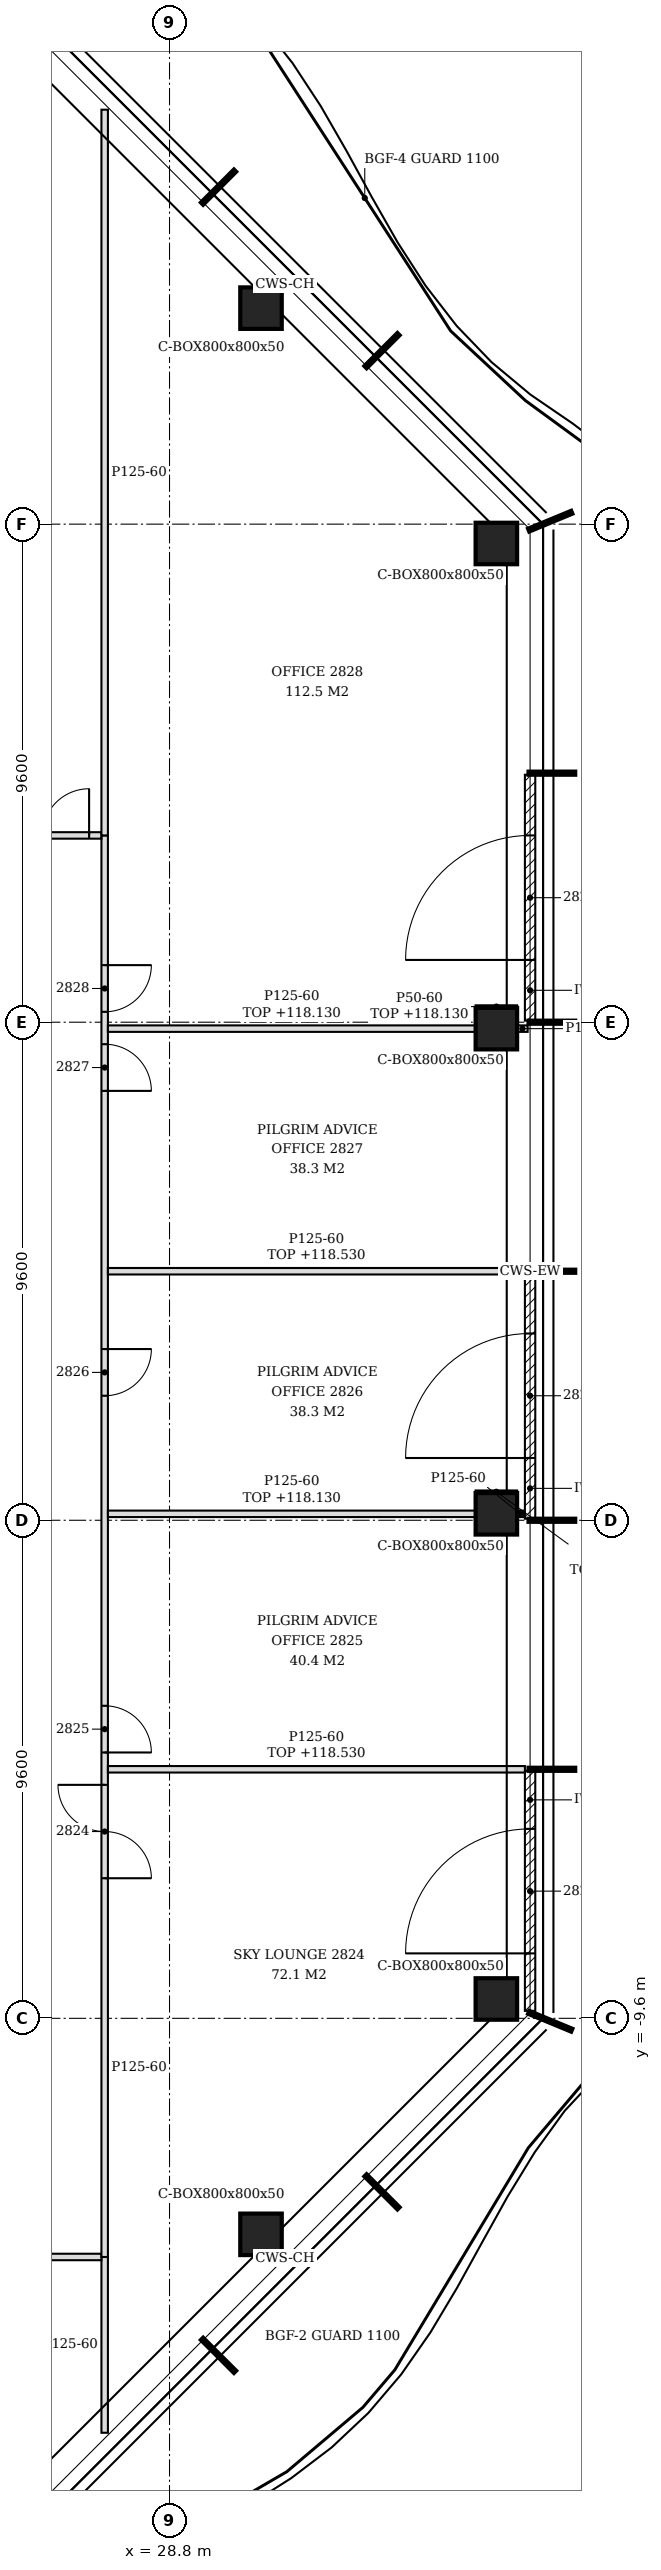
"""IFC4 building model, lengths in metres.
Left out: names, types, materials, properties, quantities, classifications, styles, units other than length and angle.
Written with IfcOpenShell. Run it as: python <this file> out.ifc"""

import sys

from ifc_helpers import new_model, si_unit, direction, frame, frame_2d, origin, origin_2d, place, context, subcontext, project, spatial, polyline, rectangle, hollow_rectangle, outline, extrude, clip, halfspace, element, fill, save


model = new_model("IFC4")
c1 = context("Model", 3, precision=1e-05, world=origin(), true_north=direction((0.0, 1.0)))
c2 = subcontext(c1, "Body", "Model", "MODEL_VIEW")
j1 = project(units=[si_unit("LENGTHUNIT", "METRE"), si_unit("PLANEANGLEUNIT", "RADIAN")], contexts=[c1])
p1 = place(None, origin())
s1 = spatial("IfcSite", under=j1, at=p1, CompositionType="ELEMENT")
p2 = place(p1, origin())
s2 = spatial("IfcBuilding", under=s1, at=p2, CompositionType="ELEMENT")
p3 = place(p2, frame((0.0, 0.0, 115.8)))
s3 = spatial("IfcBuildingStorey", under=s2, at=p3, CompositionType="ELEMENT", Elevation=115.8)
for number, where, z_axis, x_axis in (
    (1, (30.564, -13.764, -0.15), (0.0, 0.0, 1.0), (1.0, 0.0, 0.0)),
    (2, (35.1, -9.227, -0.15), (0.0, 0.0, 1.0), (1.0, 0.0, 0.0)),
    (3, (35.1, 0.124, -0.15), (0.0, 0.0, 1.0), (1.0, 0.0, 0.0)),
    (4, (35.1, 9.476, -0.15), (0.0, 0.0, 1.0), (1.0, 0.0, 0.0)),
    (5, (35.1, 18.827, -0.15), (0.0, 0.0, 1.0), (1.0, 0.0, 0.0)),
    (6, (30.564, 23.364, -0.15), (0.0, 0.0, 1.0), (1.0, 0.0, 0.0)),
):
    element("IfcColumn", number, at=place(p3, frame(where, z_axis=z_axis, x_axis=x_axis)), inside=s3, PredefinedType="COLUMN", context=c2, shape_type="Clipping", body=[
        clip(clip(extrude(hollow_rectangle(XDim=0.8, YDim=0.8, WallThickness=0.05, at=origin_2d()), origin(), (0.0, 0.0, 1.0), 3.5), halfspace(frame((0.0, 0.0, 0.021), z_axis=(0.0, 0.0, 1.0), x_axis=(1.0, 0.0, 0.0)), True)), halfspace(frame((0.0, 0.0, 3.05), z_axis=(0.0, 0.0, 1.0), x_axis=(1.0, 0.0, 0.0)), False)),
    ])
p4 = place(p3, frame((35.75, -9.457, 0.0), z_axis=(0.0, 0.0, 1.0), x_axis=(0.0, 1.0, 0.0)))
e7 = element("IfcWall", 7, at=p4, inside=s3, PredefinedType="NOTDEFINED", context=c2, shape_type="SweptSolid", body=[
    extrude(rectangle(XDim=4.626, YDim=0.2, at=frame_2d((2.313, 0.0))), origin(), (0.0, 0.0, 1.0), 3.35),
])
p5 = place(p4, frame((1.108, 0.0, 0.0)))
e8 = element("IfcOpeningElement", 8, at=p5, cuts=e7, PredefinedType="OPENING", context=c2, shape_type="SweptSolid", body=[
    extrude(rectangle(XDim=2.4, YDim=2.4, at=frame_2d((1.2, 1.2))), frame((0.0, 0.11, 0.0), z_axis=(0.0, -1.0, 0.0), x_axis=(1.0, 0.0, 0.0)), (0.0, 0.0, 1.0), 0.22),
])
p6 = place(p3, frame((35.75, 0.03, 0.0), z_axis=(0.0, 0.0, 1.0), x_axis=(0.0, 1.0, 0.0)))
e9 = element("IfcWall", 9, at=p6, inside=s3, PredefinedType="NOTDEFINED", context=c2, shape_type="SweptSolid", body=[
    extrude(rectangle(XDim=4.74, YDim=0.2, at=frame_2d((2.37, 0.0))), origin(), (0.0, 0.0, 1.0), 3.35),
])
p7 = place(p6, frame((1.17, 0.0, 0.0)))
e10 = element("IfcOpeningElement", 10, at=p7, cuts=e9, PredefinedType="OPENING", context=c2, shape_type="SweptSolid", body=[
    extrude(rectangle(XDim=2.4, YDim=2.4, at=frame_2d((1.2, 1.2))), frame((0.0, 0.11, 0.0), z_axis=(0.0, -1.0, 0.0), x_axis=(1.0, 0.0, 0.0)), (0.0, 0.0, 1.0), 0.22),
])
p8 = place(p3, frame((35.75, 9.63, 0.0), z_axis=(0.0, 0.0, 1.0), x_axis=(0.0, 1.0, 0.0)))
e11 = element("IfcWall", 11, at=p8, inside=s3, PredefinedType="NOTDEFINED", context=c2, shape_type="SweptSolid", body=[
    extrude(rectangle(XDim=4.74, YDim=0.2, at=frame_2d((2.37, 0.0))), origin(), (0.0, 0.0, 1.0), 3.35),
])
p9 = place(p8, frame((1.17, 0.0, 0.0)))
e12 = element("IfcOpeningElement", 12, at=p9, cuts=e11, PredefinedType="OPENING", context=c2, shape_type="SweptSolid", body=[
    extrude(rectangle(XDim=2.4, YDim=2.4, at=frame_2d((1.2, 1.2))), frame((0.0, 0.11, 0.0), z_axis=(0.0, -1.0, 0.0), x_axis=(1.0, 0.0, 0.0)), (0.0, 0.0, 1.0), 0.22),
])
p10 = place(p3, frame((27.55, -17.589, 0.0), z_axis=(0.0, 0.0, 1.0), x_axis=(0.0, 1.0, 0.0)))
e13 = element("IfcWall", 13, at=p10, inside=s3, PredefinedType="PARTITIONING", context=c2, shape_type="SweptSolid", body=[
    extrude(outline(polyline([(0.0, 0.0), (3.389, 0.0), (3.389, 3.35), (3.289, 3.35), (3.287, 2.83), (3.089, 2.83), (3.087, 3.35), (1.581, 3.35), (1.579, 2.33), (0.042, 2.33), (0.04, 3.35), (0.0, 3.35), (0.0, 0.0)])), frame((0.0, 0.062, 0.0), z_axis=(0.0, -1.0, 0.0), x_axis=(1.0, 0.0, 0.0)), (0.0, 0.0, 1.0), 0.125),
])
p11 = place(p3, frame((-14.4, -14.2, 0.0), z_axis=(0.0, 0.0, 1.0), x_axis=(1.0, 0.0, 0.0)))
e14 = element("IfcWall", 14, at=p11, inside=s3, PredefinedType="PARTITIONING", context=c2, shape_type="SweptSolid", body=[
    extrude(outline(polyline([(0.0, 0.0), (41.887, 0.0), (41.887, 3.35), (33.751, 3.35), (33.749, 2.322), (33.449, 2.322), (33.447, 3.35), (21.75, 3.35), (21.748, 2.83), (21.45, 2.83), (21.448, 3.35), (9.75, 3.35), (9.748, 2.83), (9.45, 2.83), (9.448, 3.35), (0.15, 3.35), (0.148, 2.93), (0.0, 2.93), (0.0, 0.0)])), frame((0.0, 0.062, 0.0), z_axis=(0.0, -1.0, 0.0), x_axis=(1.0, 0.0, 0.0)), (0.0, 0.0, 1.0), 0.125),
])
p12 = place(p11, frame((1.3, 0.0, 0.0)))
e15 = element("IfcOpeningElement", 15, at=p12, cuts=e14, PredefinedType="OPENING", context=c2, shape_type="SweptSolid", body=[
    extrude(rectangle(XDim=0.8, YDim=2.1, at=frame_2d((0.4, 1.05))), frame((0.0, 0.073, 0.0), z_axis=(0.0, -1.0, 0.0), x_axis=(1.0, 0.0, 0.0)), (0.0, 0.0, 1.0), 0.145),
])
p13 = place(p11, frame((6.0, 0.0, 0.0)))
e16 = element("IfcOpeningElement", 16, at=p13, cuts=e14, PredefinedType="OPENING", context=c2, shape_type="SweptSolid", body=[
    extrude(rectangle(XDim=0.9, YDim=2.1, at=frame_2d((0.45, 1.05))), frame((0.0, 0.073, 0.0), z_axis=(0.0, -1.0, 0.0), x_axis=(1.0, 0.0, 0.0)), (0.0, 0.0, 1.0), 0.145),
])
p14 = place(p11, frame((10.986, 0.0, 0.0)))
e17 = element("IfcOpeningElement", 17, at=p14, cuts=e14, PredefinedType="OPENING", context=c2, shape_type="SweptSolid", body=[
    extrude(rectangle(XDim=0.9, YDim=2.1, at=frame_2d((0.45, 1.05))), frame((0.0, 0.073, 0.0), z_axis=(0.0, -1.0, 0.0), x_axis=(1.0, 0.0, 0.0)), (0.0, 0.0, 1.0), 0.145),
])
p15 = place(p11, frame((15.6, 0.0, 0.0)))
e18 = element("IfcOpeningElement", 18, at=p15, cuts=e14, PredefinedType="OPENING", context=c2, shape_type="SweptSolid", body=[
    extrude(rectangle(XDim=0.9, YDim=2.1, at=frame_2d((0.45, 1.05))), frame((0.0, 0.073, 0.0), z_axis=(0.0, -1.0, 0.0), x_axis=(1.0, 0.0, 0.0)), (0.0, 0.0, 1.0), 0.145),
])
p16 = place(p11, frame((20.4, 0.0, 0.0)))
e19 = element("IfcOpeningElement", 19, at=p16, cuts=e14, PredefinedType="OPENING", context=c2, shape_type="SweptSolid", body=[
    extrude(rectangle(XDim=0.9, YDim=2.1, at=frame_2d((0.45, 1.05))), frame((0.0, 0.073, 0.0), z_axis=(0.0, -1.0, 0.0), x_axis=(1.0, 0.0, 0.0)), (0.0, 0.0, 1.0), 0.145),
])
p17 = place(p11, frame((23.4, 0.0, 0.0)))
e20 = element("IfcOpeningElement", 20, at=p17, cuts=e14, PredefinedType="OPENING", context=c2, shape_type="SweptSolid", body=[
    extrude(rectangle(XDim=0.9, YDim=2.1, at=frame_2d((0.45, 1.05))), frame((0.0, 0.073, 0.0), z_axis=(0.0, -1.0, 0.0), x_axis=(1.0, 0.0, 0.0)), (0.0, 0.0, 1.0), 0.145),
])
p18 = place(p11, frame((26.714, 0.0, 0.0)))
e21 = element("IfcOpeningElement", 21, at=p18, cuts=e14, PredefinedType="OPENING", context=c2, shape_type="SweptSolid", body=[
    extrude(rectangle(XDim=0.9, YDim=2.1, at=frame_2d((0.45, 1.05))), frame((0.0, 0.073, 0.0), z_axis=(0.0, -1.0, 0.0), x_axis=(1.0, 0.0, 0.0)), (0.0, 0.0, 1.0), 0.145),
])
p19 = place(p11, frame((31.6, 0.0, 0.0)))
e22 = element("IfcOpeningElement", 22, at=p19, cuts=e14, PredefinedType="OPENING", context=c2, shape_type="SweptSolid", body=[
    extrude(rectangle(XDim=0.9, YDim=2.1, at=frame_2d((0.45, 1.05))), frame((0.0, 0.073, 0.0), z_axis=(0.0, -1.0, 0.0), x_axis=(1.0, 0.0, 0.0)), (0.0, 0.0, 1.0), 0.145),
])
p20 = place(p11, frame((33.95, 0.0, 0.0)))
e23 = element("IfcOpeningElement", 23, at=p20, cuts=e14, PredefinedType="OPENING", context=c2, shape_type="SweptSolid", body=[
    extrude(rectangle(XDim=0.8, YDim=2.1, at=frame_2d((0.4, 1.05))), frame((0.0, 0.073, 0.0), z_axis=(0.0, -1.0, 0.0), x_axis=(1.0, 0.0, 0.0)), (0.0, 0.0, 1.0), 0.145),
])
p21 = place(p3, frame((27.55, -14.2, 0.0), z_axis=(0.0, 0.0, 1.0), x_axis=(0.0, 1.0, 0.0)))
e24 = element("IfcWall", 24, at=p21, inside=s3, PredefinedType="PARTITIONING", context=c2, shape_type="SweptSolid", body=[
    extrude(outline(polyline([(0.0, 0.0), (27.4, 0.0), (27.4, 3.35), (24.3, 3.35), (24.298, 2.33), (23.3, 2.33), (23.298, 3.35), (19.11, 3.35), (19.108, 2.73), (18.89, 2.73), (18.888, 3.35), (14.7, 3.35), (14.698, 2.33), (13.7, 2.33), (13.698, 3.35), (9.51, 3.35), (9.508, 2.73), (9.29, 2.73), (9.288, 3.35), (4.71, 3.35), (4.708, 2.73), (4.49, 2.73), (4.488, 3.35), (0.0, 3.35), (0.0, 0.0)])), frame((0.0, 0.062, 0.0), z_axis=(0.0, -1.0, 0.0), x_axis=(1.0, 0.0, 0.0)), (0.0, 0.0, 1.0), 0.125),
])
p22 = place(p21, frame((7.3, 0.0, 0.0)))
e25 = element("IfcOpeningElement", 25, at=p22, cuts=e24, PredefinedType="OPENING", context=c2, shape_type="SweptSolid", body=[
    extrude(rectangle(XDim=1.8, YDim=2.1, at=frame_2d((0.9, 1.05))), frame((0.0, 0.073, 0.0), z_axis=(0.0, -1.0, 0.0), x_axis=(1.0, 0.0, 0.0)), (0.0, 0.0, 1.0), 0.145),
])
p23 = place(p21, frame((9.724, 0.0, 0.0)))
e26 = element("IfcOpeningElement", 26, at=p23, cuts=e24, PredefinedType="OPENING", context=c2, shape_type="SweptSolid", body=[
    extrude(rectangle(XDim=0.9, YDim=2.1, at=frame_2d((0.45, 1.05))), frame((0.0, 0.073, 0.0), z_axis=(0.0, -1.0, 0.0), x_axis=(1.0, 0.0, 0.0)), (0.0, 0.0, 1.0), 0.145),
])
p24 = place(p21, frame((16.6, 0.0, 0.0)))
e27 = element("IfcOpeningElement", 27, at=p24, cuts=e24, PredefinedType="OPENING", context=c2, shape_type="SweptSolid", body=[
    extrude(rectangle(XDim=0.9, YDim=2.1, at=frame_2d((0.45, 1.05))), frame((0.0, 0.073, 0.0), z_axis=(0.0, -1.0, 0.0), x_axis=(1.0, 0.0, 0.0)), (0.0, 0.0, 1.0), 0.145),
])
p25 = place(p21, frame((22.476, 0.0, 0.0)))
e28 = element("IfcOpeningElement", 28, at=p25, cuts=e24, PredefinedType="OPENING", context=c2, shape_type="SweptSolid", body=[
    extrude(rectangle(XDim=0.9, YDim=2.1, at=frame_2d((0.45, 1.05))), frame((0.0, 0.073, 0.0), z_axis=(0.0, -1.0, 0.0), x_axis=(1.0, 0.0, 0.0)), (0.0, 0.0, 1.0), 0.145),
])
p26 = place(p21, frame((24.0, 0.0, 0.0)))
e29 = element("IfcOpeningElement", 29, at=p26, cuts=e24, PredefinedType="OPENING", context=c2, shape_type="SweptSolid", body=[
    extrude(rectangle(XDim=0.9, YDim=2.1, at=frame_2d((0.45, 1.05))), frame((0.0, 0.073, 0.0), z_axis=(0.0, -1.0, 0.0), x_axis=(1.0, 0.0, 0.0)), (0.0, 0.0, 1.0), 0.145),
])
p27 = place(p3, frame((27.613, -4.8, 0.0), z_axis=(0.0, 0.0, 1.0), x_axis=(1.0, 0.0, 0.0)))
e30 = element("IfcWall", 30, at=p27, inside=s3, PredefinedType="PARTITIONING", context=c2, shape_type="SweptSolid", body=[
    extrude(outline(polyline([(0.0, 0.0), (8.037, 0.0), (8.038, 2.73), (7.988, 2.73), (7.986, 2.33), (6.988, 2.33), (6.986, 2.73), (0.0, 2.73), (0.0, 0.0)])), frame((0.0, 0.062, 0.0), z_axis=(0.0, -1.0, 0.0), x_axis=(1.0, 0.0, 0.0)), (0.0, 0.0, 1.0), 0.125),
])
p28 = place(p3, frame((27.613, 0.124, 0.0), z_axis=(0.0, 0.0, 1.0), x_axis=(1.0, 0.0, 0.0)))
e31 = element("IfcWall", 31, at=p28, inside=s3, PredefinedType="PARTITIONING", context=c2, shape_type="SweptSolid", body=[
    extrude(rectangle(XDim=7.087, YDim=0.125, at=frame_2d((3.544, 0.0))), origin(), (0.0, 0.0, 1.0), 2.33),
])
p29 = place(p3, frame((35.5, 0.124, 0.0), z_axis=(0.0, 0.0, 1.0), x_axis=(1.0, 0.0, 0.0)))
e32 = element("IfcWall", 32, at=p29, inside=s3, PredefinedType="PARTITIONING", context=c2, shape_type="SweptSolid", body=[
    extrude(outline(polyline([(0.0, 0.0), (0.12, 0.0), (0.12, 3.35), (0.1, 3.35), (0.098, 2.33), (0.0, 2.33), (0.0, 0.0)])), frame((0.0, 0.062, 0.0), z_axis=(0.0, -1.0, 0.0), x_axis=(1.0, 0.0, 0.0)), (0.0, 0.0, 1.0), 0.125),
])
p30 = place(p3, frame((27.613, 4.8, 0.0), z_axis=(0.0, 0.0, 1.0), x_axis=(1.0, 0.0, 0.0)))
e33 = element("IfcWall", 33, at=p30, inside=s3, PredefinedType="PARTITIONING", context=c2, shape_type="SweptSolid", body=[
    extrude(outline(polyline([(0.0, 0.0), (8.037, 0.0), (8.038, 2.73), (7.988, 2.73), (7.986, 2.33), (6.988, 2.33), (6.986, 2.73), (0.0, 2.73), (0.0, 0.0)])), frame((0.0, 0.062, 0.0), z_axis=(0.0, -1.0, 0.0), x_axis=(1.0, 0.0, 0.0)), (0.0, 0.0, 1.0), 0.125),
])
p31 = place(p3, frame((27.613, 9.476, 0.0), z_axis=(0.0, 0.0, 1.0), x_axis=(1.0, 0.0, 0.0)))
e34 = element("IfcWall", 34, at=p31, inside=s3, PredefinedType="PARTITIONING", context=c2, shape_type="SweptSolid", body=[
    extrude(rectangle(XDim=7.087, YDim=0.125, at=frame_2d((3.544, 0.0))), origin(), (0.0, 0.0, 1.0), 2.33),
])
p32 = place(p3, frame((35.5, 9.476, 0.0), z_axis=(0.0, 0.0, 1.0), x_axis=(1.0, 0.0, 0.0)))
e35 = element("IfcWall", 35, at=p32, inside=s3, PredefinedType="PARTITIONING", context=c2, shape_type="SweptSolid", body=[
    extrude(outline(polyline([(0.0, 0.0), (0.203, 0.0), (0.203, 3.35), (0.1, 3.35), (0.098, 2.33), (0.0, 2.33), (0.0, 0.0)])), frame((0.0, 0.062, 0.0), z_axis=(0.0, -1.0, 0.0), x_axis=(1.0, 0.0, 0.0)), (0.0, 0.0, 1.0), 0.125),
])
p33 = place(p3, frame((25.15, 13.2, 0.0), z_axis=(0.0, 0.0, 1.0), x_axis=(1.0, 0.0, 0.0)))
e36 = element("IfcWall", 36, at=p33, inside=s3, PredefinedType="PARTITIONING", context=c2, shape_type="SweptSolid", body=[
    extrude(rectangle(XDim=2.338, YDim=0.125, at=frame_2d((1.169, 0.0))), origin(), (0.0, 0.0, 1.0), 3.35),
])
p34 = place(p33, frame((0.3, 0.0, 0.0)))
e37 = element("IfcOpeningElement", 37, at=p34, cuts=e36, PredefinedType="OPENING", context=c2, shape_type="SweptSolid", body=[
    extrude(rectangle(XDim=1.8, YDim=2.1, at=frame_2d((0.9, 1.05))), frame((0.0, 0.073, 0.0), z_axis=(0.0, -1.0, 0.0), x_axis=(1.0, 0.0, 0.0)), (0.0, 0.0, 1.0), 0.145),
])
p35 = place(p3, frame((27.55, 13.2, 0.0), z_axis=(0.0, 0.0, 1.0), x_axis=(0.0, 1.0, 0.0)))
e38 = element("IfcWall", 38, at=p35, inside=s3, PredefinedType="PARTITIONING", context=c2, shape_type="SweptSolid", body=[
    extrude(outline(polyline([(0.0, 0.0), (13.989, 0.0), (13.989, 3.35), (13.947, 3.35), (13.945, 2.33), (12.408, 2.33), (12.406, 3.35), (10.9, 3.35), (10.898, 2.83), (10.7, 2.83), (10.698, 3.35), (6.11, 3.35), (6.108, 2.73), (5.89, 2.73), (5.888, 3.35), (1.31, 3.35), (1.308, 2.73), (1.09, 2.73), (1.088, 3.35), (0.0, 3.35), (0.0, 0.0)])), frame((0.0, 0.062, 0.0), z_axis=(0.0, -1.0, 0.0), x_axis=(1.0, 0.0, 0.0)), (0.0, 0.0, 1.0), 0.125),
])
for number, where, z_axis, x_axis in (
    (39, (34.7, 0.549, 0.0), (0.0, 0.0, 1.0), (1.0, 0.0, 0.0)),
    (40, (34.7, 9.901, 0.0), (0.0, 0.0, 1.0), (1.0, 0.0, 0.0)),
):
    element("IfcWall", number, at=place(p3, frame(where, z_axis=z_axis, x_axis=x_axis)), inside=s3, PredefinedType="PARTITIONING", context=c2, shape_type="SweptSolid", body=[
        extrude(rectangle(XDim=0.8, YDim=0.05, at=frame_2d((0.4, 0.0))), origin(), (0.0, 0.0, 1.0), 2.33),
    ])
p36 = place(p5, origin())
e41 = element("IfcDoor", 41, at=p36, inside=s3, OperationType="SINGLE_SWING_LEFT", PredefinedType="DOOR", context=c2, shape_type="SweptSolid", body=[
    extrude(rectangle(XDim=2.4, YDim=2.4, at=frame_2d((1.2, 1.2))), frame((0.0, 0.025, 0.0), z_axis=(0.0, -1.0, 0.0), x_axis=(1.0, 0.0, 0.0)), (0.0, 0.0, 1.0), 0.05),
])
fill(e8, e41)
p37 = place(p7, origin())
e42 = element("IfcDoor", 42, at=p37, inside=s3, OperationType="SINGLE_SWING_LEFT", PredefinedType="DOOR", context=c2, shape_type="SweptSolid", body=[
    extrude(rectangle(XDim=2.4, YDim=2.4, at=frame_2d((1.2, 1.2))), frame((0.0, 0.025, 0.0), z_axis=(0.0, -1.0, 0.0), x_axis=(1.0, 0.0, 0.0)), (0.0, 0.0, 1.0), 0.05),
])
fill(e10, e42)
p38 = place(p9, origin())
e43 = element("IfcDoor", 43, at=p38, inside=s3, OperationType="SINGLE_SWING_LEFT", PredefinedType="DOOR", context=c2, shape_type="SweptSolid", body=[
    extrude(rectangle(XDim=2.4, YDim=2.4, at=frame_2d((1.2, 1.2))), frame((0.0, 0.025, 0.0), z_axis=(0.0, -1.0, 0.0), x_axis=(1.0, 0.0, 0.0)), (0.0, 0.0, 1.0), 0.05),
])
fill(e12, e43)
p39 = place(p34, origin())
e44 = element("IfcDoor", 44, at=p39, inside=s3, OperationType="DOUBLE_DOOR_SINGLE_SWING", PredefinedType="DOOR", context=c2, shape_type="SweptSolid", body=[
    extrude(rectangle(XDim=1.8, YDim=2.1, at=frame_2d((0.9, 1.05))), frame((0.0, 0.025, 0.0), z_axis=(0.0, -1.0, 0.0), x_axis=(1.0, 0.0, 0.0)), (0.0, 0.0, 1.0), 0.05),
])
fill(e37, e44)
p40 = place(p22, frame((1.8, 0.0, 0.0), z_axis=(0.0, 0.0, 1.0), x_axis=(-1.0, 0.0, 0.0)))
e45 = element("IfcDoor", 45, at=p40, inside=s3, OperationType="DOUBLE_DOOR_SINGLE_SWING", PredefinedType="DOOR", context=c2, shape_type="SweptSolid", body=[
    extrude(rectangle(XDim=1.8, YDim=2.1, at=frame_2d((0.9, 1.05))), frame((0.0, 0.025, 0.0), z_axis=(0.0, -1.0, 0.0), x_axis=(1.0, 0.0, 0.0)), (0.0, 0.0, 1.0), 0.05),
])
fill(e25, e45)
p41 = place(p23, frame((0.9, 0.0, 0.0), z_axis=(0.0, 0.0, 1.0), x_axis=(-1.0, 0.0, 0.0)))
e46 = element("IfcDoor", 46, at=p41, inside=s3, OperationType="SINGLE_SWING_RIGHT", PredefinedType="DOOR", context=c2, shape_type="SweptSolid", body=[
    extrude(rectangle(XDim=0.9, YDim=2.1, at=frame_2d((0.45, 1.05))), frame((0.0, 0.025, 0.0), z_axis=(0.0, -1.0, 0.0), x_axis=(1.0, 0.0, 0.0)), (0.0, 0.0, 1.0), 0.05),
])
fill(e26, e46)
p42 = place(p24, frame((0.9, 0.0, 0.0), z_axis=(0.0, 0.0, 1.0), x_axis=(-1.0, 0.0, 0.0)))
e47 = element("IfcDoor", 47, at=p42, inside=s3, OperationType="SINGLE_SWING_LEFT", PredefinedType="DOOR", context=c2, shape_type="SweptSolid", body=[
    extrude(rectangle(XDim=0.9, YDim=2.1, at=frame_2d((0.45, 1.05))), frame((0.0, 0.025, 0.0), z_axis=(0.0, -1.0, 0.0), x_axis=(1.0, 0.0, 0.0)), (0.0, 0.0, 1.0), 0.05),
])
fill(e27, e47)
p43 = place(p25, frame((0.9, 0.0, 0.0), z_axis=(0.0, 0.0, 1.0), x_axis=(-1.0, 0.0, 0.0)))
e48 = element("IfcDoor", 48, at=p43, inside=s3, OperationType="SINGLE_SWING_RIGHT", PredefinedType="DOOR", context=c2, shape_type="SweptSolid", body=[
    extrude(rectangle(XDim=0.9, YDim=2.1, at=frame_2d((0.45, 1.05))), frame((0.0, 0.025, 0.0), z_axis=(0.0, -1.0, 0.0), x_axis=(1.0, 0.0, 0.0)), (0.0, 0.0, 1.0), 0.05),
])
fill(e28, e48)
p44 = place(p26, frame((0.9, 0.0, 0.0), z_axis=(0.0, 0.0, 1.0), x_axis=(-1.0, 0.0, 0.0)))
e49 = element("IfcDoor", 49, at=p44, inside=s3, OperationType="SINGLE_SWING_LEFT", PredefinedType="DOOR", context=c2, shape_type="SweptSolid", body=[
    extrude(rectangle(XDim=0.9, YDim=2.1, at=frame_2d((0.45, 1.05))), frame((0.0, 0.025, 0.0), z_axis=(0.0, -1.0, 0.0), x_axis=(1.0, 0.0, 0.0)), (0.0, 0.0, 1.0), 0.05),
])
fill(e29, e49)
save(model, sys.argv[1])
